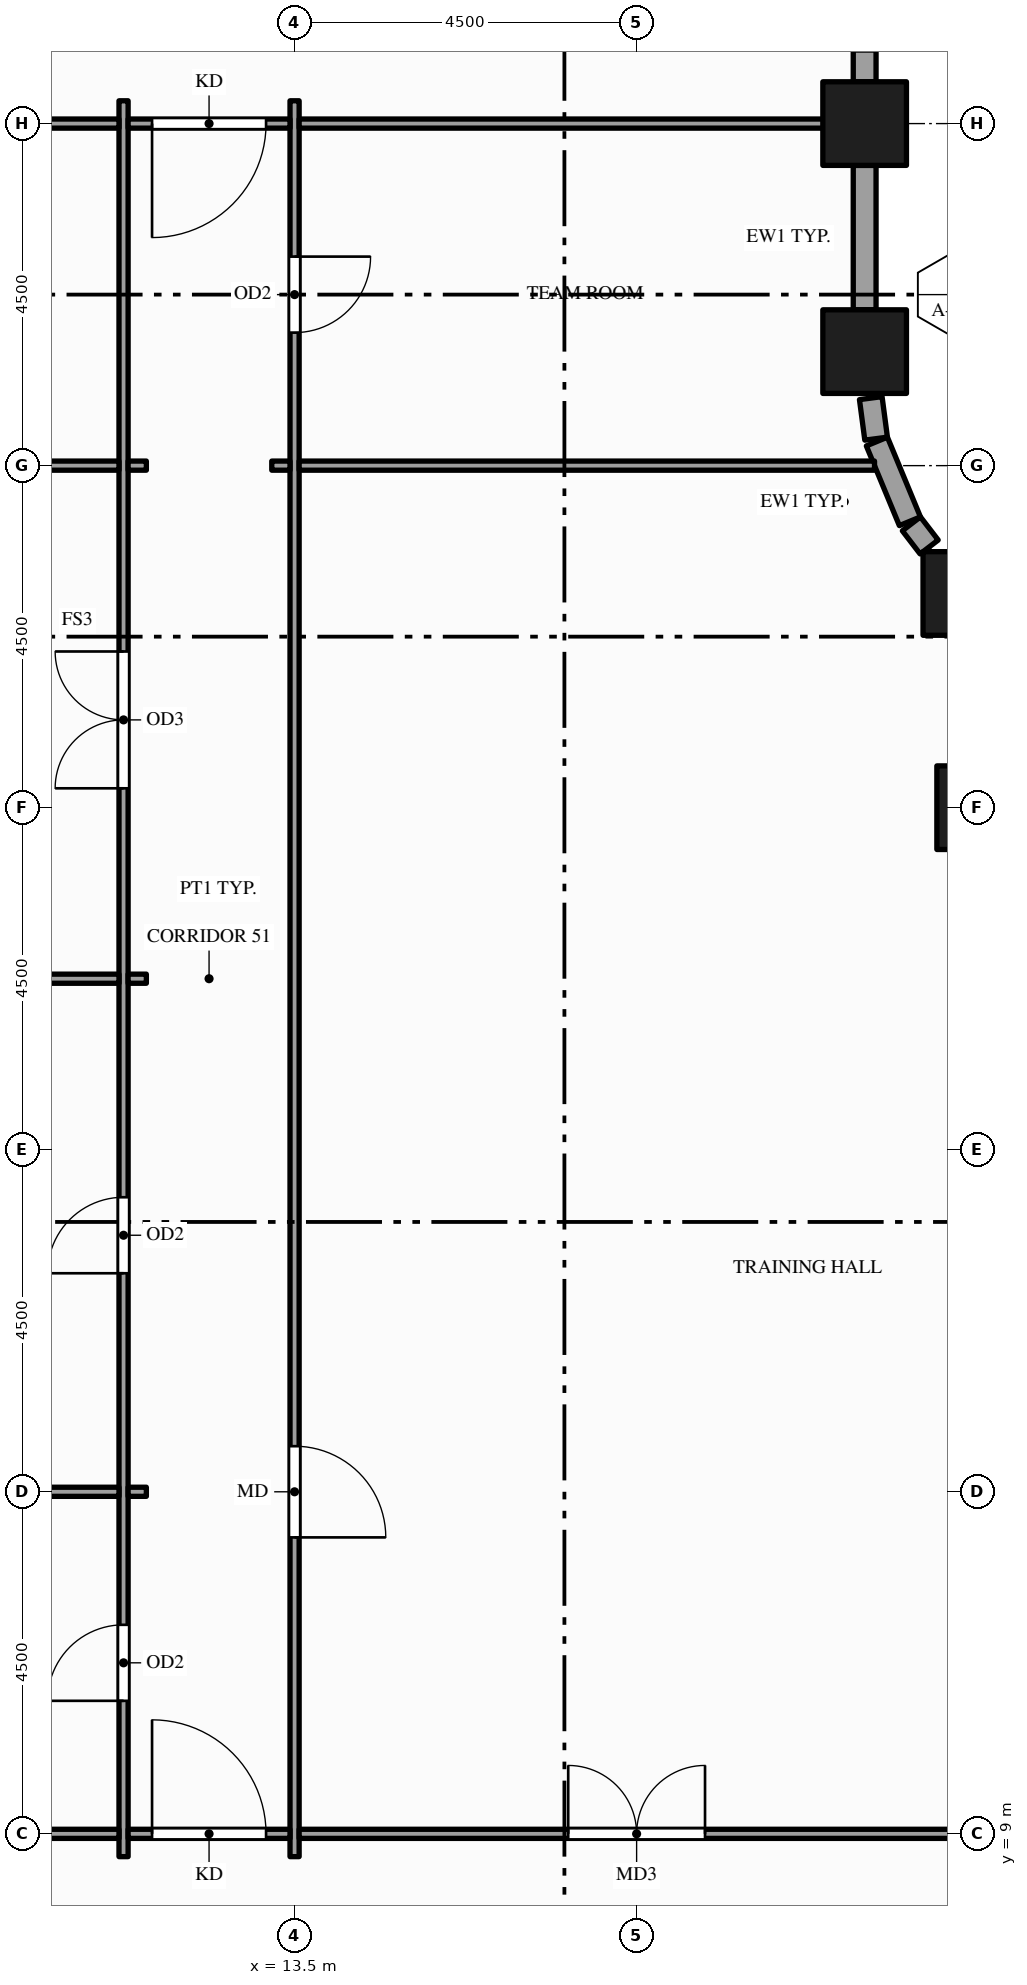
"""IFC4 building model, lengths in metres.
Left out: names, types, materials, properties, quantities, classifications, styles, units other than length and angle.
Written with IfcOpenShell. Run it as: python <this file> out.ifc"""

import sys

from ifc_helpers import new_model, si_unit, direction, frame, frame_2d, origin, origin_2d, place, context, subcontext, project, spatial, rectangle, hollow_rectangle, extrude, element, fill, save


model = new_model("IFC4")
c1 = context("Model", 3, precision=1e-05, world=origin(), true_north=direction((0.0, 1.0)))
c2 = subcontext(c1, "Body", "Model", "MODEL_VIEW")
j1 = project(units=[si_unit("LENGTHUNIT", "METRE"), si_unit("PLANEANGLEUNIT", "RADIAN")], contexts=[c1])
p1 = place(None, origin())
s1 = spatial("IfcSite", under=j1, at=p1, CompositionType="ELEMENT")
p2 = place(p1, origin())
s2 = spatial("IfcBuilding", under=s1, at=p2, CompositionType="ELEMENT")
p3 = place(p2, frame((0.0, 0.0, 49.0)))
s3 = spatial("IfcBuildingStorey", under=s2, at=p3, CompositionType="ELEMENT", Elevation=49.0)
for number, where, z_axis, x_axis in (
    (1, (21.0, 28.5, -0.15), (0.0, 0.0, 1.0), (1.0, 0.0, 0.0)),
    (2, (21.0, 31.5, -0.15), (0.0, 0.0, 1.0), (1.0, 0.0, 0.0)),
    (3, (22.318, 25.318, -0.15), (0.0, 0.0, 1.0), (1.0, 0.0, 0.0)),
    (4, (22.5, 22.5, -0.15), (0.0, 0.0, 1.0), (1.0, 0.0, 0.0)),
):
    element("IfcColumn", number, at=place(p3, frame(where, z_axis=z_axis, x_axis=x_axis)), inside=s3, PredefinedType="COLUMN", context=c2, shape_type="SweptSolid", body=[
        extrude(hollow_rectangle(XDim=1.1, YDim=1.1, WallThickness=0.06, at=origin_2d()), origin(), (0.0, 0.0, 1.0), 4.0),
    ])
p4 = place(p3, frame((21.849, 25.93, 0.0), z_axis=(0.0, 0.0, 1.0), x_axis=(-0.60851163405, 0.79354495224, 0.0)))
e5 = element("IfcWall", 5, at=p4, inside=s3, PredefinedType="STANDARD", context=c2, shape_type="SweptSolid", body=[
    extrude(rectangle(XDim=0.384, YDim=0.3, at=frame_2d((0.192, 0.0))), origin(), (0.0, 0.0, 1.0), 3.144),
])
p5 = place(p3, frame((21.595, 26.268, 0.0), z_axis=(0.0, 0.0, 1.0), x_axis=(-0.382598720491, 0.923914616768, 0.0)))
e6 = element("IfcWall", 6, at=p5, inside=s3, PredefinedType="STANDARD", context=c2, shape_type="SweptSolid", body=[
    extrude(rectangle(XDim=1.135, YDim=0.3, at=frame_2d((0.568, 0.0))), origin(), (0.0, 0.0, 1.0), 3.144),
])
p6 = place(p3, frame((21.151, 27.355, 0.0), z_axis=(0.0, 0.0, 1.0), x_axis=(-0.130736330569, 0.991417173479, 0.0)))
e7 = element("IfcWall", 7, at=p6, inside=s3, PredefinedType="STANDARD", context=c2, shape_type="SweptSolid", body=[
    extrude(rectangle(XDim=0.538, YDim=0.3, at=frame_2d((0.269, 0.0))), origin(), (0.0, 0.0, 1.0), 3.144),
])
p7 = place(p3, frame((21.0, 29.05, 0.0), z_axis=(0.0, 0.0, 1.0), x_axis=(0.0, 1.0, 0.0)))
e8 = element("IfcWall", 8, at=p7, inside=s3, PredefinedType="STANDARD", context=c2, shape_type="SweptSolid", body=[
    extrude(rectangle(XDim=1.9, YDim=0.3, at=frame_2d((0.95, 0.0))), origin(), (0.0, 0.0, 1.0), 3.144),
])
p8 = place(p3, frame((21.0, 32.05, 0.0), z_axis=(0.0, 0.0, 1.0), x_axis=(0.0, 1.0, 0.0)))
e9 = element("IfcWall", 9, at=p8, inside=s3, PredefinedType="STANDARD", context=c2, shape_type="SweptSolid", body=[
    extrude(rectangle(XDim=3.95, YDim=0.3, at=frame_2d((1.975, 0.0))), origin(), (0.0, 0.0, 1.0), 3.144),
])
p9 = place(p8, frame((0.4, 0.0, 0.9)))
e10 = element("IfcOpeningElement", 10, at=p9, cuts=e9, PredefinedType="OPENING", context=c2, shape_type="SweptSolid", body=[
    extrude(rectangle(XDim=1.0, YDim=2.0, at=frame_2d((0.5, 1.0))), frame((0.0, 0.16, 0.0), z_axis=(0.0, -1.0, 0.0), x_axis=(1.0, 0.0, 0.0)), (0.0, 0.0, 1.0), 0.32),
])
p10 = place(p8, frame((2.0, 0.0, 0.9)))
e11 = element("IfcOpeningElement", 11, at=p10, cuts=e9, PredefinedType="OPENING", context=c2, shape_type="SweptSolid", body=[
    extrude(rectangle(XDim=1.55, YDim=2.0, at=frame_2d((0.775, 1.0))), frame((0.0, 0.16, 0.0), z_axis=(0.0, -1.0, 0.0), x_axis=(1.0, 0.0, 0.0)), (0.0, 0.0, 1.0), 0.32),
])
p11 = place(p3, frame((11.25, 8.7, 0.0), z_axis=(0.0, 0.0, 1.0), x_axis=(0.0, 1.0, 0.0)))
e12 = element("IfcWall", 12, at=p11, inside=s3, PredefinedType="PARTITIONING", context=c2, shape_type="SweptSolid", body=[
    extrude(rectangle(XDim=23.1, YDim=0.12, at=frame_2d((11.55, 0.0))), origin(), (0.0, 0.0, 1.0), 2.6),
])
p12 = place(p11, frame((2.05, 0.0, 0.0)))
e13 = element("IfcOpeningElement", 13, at=p12, cuts=e12, PredefinedType="OPENING", context=c2, shape_type="SweptSolid", body=[
    extrude(rectangle(XDim=1.0, YDim=2.1, at=frame_2d((0.5, 1.05))), frame((0.0, 0.07, 0.0), z_axis=(0.0, -1.0, 0.0), x_axis=(1.0, 0.0, 0.0)), (0.0, 0.0, 1.0), 0.14),
])
p13 = place(p11, frame((7.675, 0.0, 0.0)))
e14 = element("IfcOpeningElement", 14, at=p13, cuts=e12, PredefinedType="OPENING", context=c2, shape_type="SweptSolid", body=[
    extrude(rectangle(XDim=1.0, YDim=2.1, at=frame_2d((0.5, 1.05))), frame((0.0, 0.07, 0.0), z_axis=(0.0, -1.0, 0.0), x_axis=(1.0, 0.0, 0.0)), (0.0, 0.0, 1.0), 0.14),
])
p14 = place(p11, frame((14.055, 0.0, 0.0)))
e15 = element("IfcOpeningElement", 15, at=p14, cuts=e12, PredefinedType="OPENING", context=c2, shape_type="SweptSolid", body=[
    extrude(rectangle(XDim=1.8, YDim=2.1, at=frame_2d((0.9, 1.05))), frame((0.0, 0.07, 0.0), z_axis=(0.0, -1.0, 0.0), x_axis=(1.0, 0.0, 0.0)), (0.0, 0.0, 1.0), 0.14),
])
p15 = place(p3, frame((13.5, 8.7, 0.0), z_axis=(0.0, 0.0, 1.0), x_axis=(0.0, 1.0, 0.0)))
e16 = element("IfcWall", 16, at=p15, inside=s3, PredefinedType="PARTITIONING", context=c2, shape_type="SweptSolid", body=[
    extrude(rectangle(XDim=23.1, YDim=0.12, at=frame_2d((11.55, 0.0))), origin(), (0.0, 0.0, 1.0), 2.6),
])
p16 = place(p15, frame((20.05, 0.0, 0.0)))
e17 = element("IfcOpeningElement", 17, at=p16, cuts=e16, PredefinedType="OPENING", context=c2, shape_type="SweptSolid", body=[
    extrude(rectangle(XDim=1.0, YDim=2.1, at=frame_2d((0.5, 1.05))), frame((0.0, 0.07, 0.0), z_axis=(0.0, -1.0, 0.0), x_axis=(1.0, 0.0, 0.0)), (0.0, 0.0, 1.0), 0.14),
])
p17 = place(p15, frame((4.2, 0.0, 0.0)))
e18 = element("IfcOpeningElement", 18, at=p17, cuts=e16, PredefinedType="OPENING", context=c2, shape_type="SweptSolid", body=[
    extrude(rectangle(XDim=1.2, YDim=2.1, at=frame_2d((0.6, 1.05))), frame((0.0, 0.07, 0.0), z_axis=(0.0, -1.0, 0.0), x_axis=(1.0, 0.0, 0.0)), (0.0, 0.0, 1.0), 0.14),
])
p18 = place(p3, frame((0.15, 9.0, 0.0), z_axis=(0.0, 0.0, 1.0), x_axis=(1.0, 0.0, 0.0)))
e19 = element("IfcWall", 19, at=p18, inside=s3, PredefinedType="PARTITIONING", context=c2, shape_type="SweptSolid", body=[
    extrude(rectangle(XDim=11.04, YDim=0.12, at=frame_2d((5.52, 0.0))), origin(), (0.0, 0.0, 1.0), 2.938),
])
p19 = place(p3, frame((11.31, 9.0, 0.0), z_axis=(0.0, 0.0, 1.0), x_axis=(1.0, 0.0, 0.0)))
e20 = element("IfcWall", 20, at=p19, inside=s3, PredefinedType="PARTITIONING", context=c2, shape_type="SweptSolid", body=[
    extrude(rectangle(XDim=2.13, YDim=0.12, at=frame_2d((1.065, 0.0))), origin(), (0.0, 0.0, 1.0), 2.938),
])
p20 = place(p19, frame((0.315, 0.0, 0.0)))
e21 = element("IfcOpeningElement", 21, at=p20, cuts=e20, PredefinedType="OPENING", context=c2, shape_type="SweptSolid", body=[
    extrude(rectangle(XDim=1.5, YDim=2.1, at=frame_2d((0.75, 1.05))), frame((0.0, 0.07, 0.0), z_axis=(0.0, -1.0, 0.0), x_axis=(1.0, 0.0, 0.0)), (0.0, 0.0, 1.0), 0.14),
])
p21 = place(p3, frame((13.56, 9.0, 0.0), z_axis=(0.0, 0.0, 1.0), x_axis=(1.0, 0.0, 0.0)))
e22 = element("IfcWall", 22, at=p21, inside=s3, PredefinedType="PARTITIONING", context=c2, shape_type="SweptSolid", body=[
    extrude(rectangle(XDim=13.38, YDim=0.12, at=frame_2d((6.69, 0.0))), origin(), (0.0, 0.0, 1.0), 2.938),
])
p22 = place(p21, frame((3.54, 0.0, 0.0)))
e23 = element("IfcOpeningElement", 23, at=p22, cuts=e22, PredefinedType="OPENING", context=c2, shape_type="SweptSolid", body=[
    extrude(rectangle(XDim=1.8, YDim=2.1, at=frame_2d((0.9, 1.05))), frame((0.0, 0.07, 0.0), z_axis=(0.0, -1.0, 0.0), x_axis=(1.0, 0.0, 0.0)), (0.0, 0.0, 1.0), 0.14),
])
p23 = place(p3, frame((0.15, 13.5, 0.0), z_axis=(0.0, 0.0, 1.0), x_axis=(1.0, 0.0, 0.0)))
e24 = element("IfcWall", 24, at=p23, inside=s3, PredefinedType="PARTITIONING", context=c2, shape_type="SweptSolid", body=[
    extrude(rectangle(XDim=11.04, YDim=0.12, at=frame_2d((5.52, 0.0))), origin(), (0.0, 0.0, 1.0), 2.938),
])
p24 = place(p3, frame((11.31, 13.5, 0.0), z_axis=(0.0, 0.0, 1.0), x_axis=(1.0, 0.0, 0.0)))
e25 = element("IfcWall", 25, at=p24, inside=s3, PredefinedType="PARTITIONING", context=c2, shape_type="SweptSolid", body=[
    extrude(rectangle(XDim=0.24, YDim=0.12, at=frame_2d((0.12, 0.0))), origin(), (0.0, 0.0, 1.0), 2.938),
])
p25 = place(p3, frame((0.15, 20.25, 0.0), z_axis=(0.0, 0.0, 1.0), x_axis=(1.0, 0.0, 0.0)))
e26 = element("IfcWall", 26, at=p25, inside=s3, PredefinedType="PARTITIONING", context=c2, shape_type="SweptSolid", body=[
    extrude(rectangle(XDim=11.04, YDim=0.12, at=frame_2d((5.52, 0.0))), origin(), (0.0, 0.0, 1.0), 2.938),
])
p26 = place(p3, frame((11.31, 20.25, 0.0), z_axis=(0.0, 0.0, 1.0), x_axis=(1.0, 0.0, 0.0)))
e27 = element("IfcWall", 27, at=p26, inside=s3, PredefinedType="PARTITIONING", context=c2, shape_type="SweptSolid", body=[
    extrude(rectangle(XDim=0.24, YDim=0.12, at=frame_2d((0.12, 0.0))), origin(), (0.0, 0.0, 1.0), 2.938),
])
p27 = place(p3, frame((7.06, 27.0, 0.0), z_axis=(0.0, 0.0, 1.0), x_axis=(1.0, 0.0, 0.0)))
e28 = element("IfcWall", 28, at=p27, inside=s3, PredefinedType="PARTITIONING", context=c2, shape_type="SweptSolid", body=[
    extrude(rectangle(XDim=4.13, YDim=0.12, at=frame_2d((2.065, 0.0))), origin(), (0.0, 0.0, 1.0), 2.938),
])
for number, where, z_axis, x_axis in (
    (29, (11.31, 27.0, 0.0), (0.0, 0.0, 1.0), (1.0, 0.0, 0.0)),
    (30, (13.2, 27.0, 0.0), (0.0, 0.0, 1.0), (1.0, 0.0, 0.0)),
):
    element("IfcWall", number, at=place(p3, frame(where, z_axis=z_axis, x_axis=x_axis)), inside=s3, PredefinedType="PARTITIONING", context=c2, shape_type="SweptSolid", body=[
        extrude(rectangle(XDim=0.24, YDim=0.12, at=frame_2d((0.12, 0.0))), origin(), (0.0, 0.0, 1.0), 2.938),
    ])
p28 = place(p3, frame((13.56, 27.0, 0.0), z_axis=(0.0, 0.0, 1.0), x_axis=(1.0, 0.0, 0.0)))
e31 = element("IfcWall", 31, at=p28, inside=s3, PredefinedType="PARTITIONING", context=c2, shape_type="SweptSolid", body=[
    extrude(rectangle(XDim=7.57, YDim=0.12, at=frame_2d((3.785, 0.0))), origin(), (0.0, 0.0, 1.0), 2.938),
])
p29 = place(p3, frame((7.06, 31.5, 0.0), z_axis=(0.0, 0.0, 1.0), x_axis=(1.0, 0.0, 0.0)))
e32 = element("IfcWall", 32, at=p29, inside=s3, PredefinedType="PARTITIONING", context=c2, shape_type="SweptSolid", body=[
    extrude(rectangle(XDim=4.13, YDim=0.12, at=frame_2d((2.065, 0.0))), origin(), (0.0, 0.0, 1.0), 2.938),
])
p30 = place(p29, frame((1.565, 0.0, 0.0)))
e33 = element("IfcOpeningElement", 33, at=p30, cuts=e32, PredefinedType="OPENING", context=c2, shape_type="SweptSolid", body=[
    extrude(rectangle(XDim=1.0, YDim=2.1, at=frame_2d((0.5, 1.05))), frame((0.0, 0.07, 0.0), z_axis=(0.0, -1.0, 0.0), x_axis=(1.0, 0.0, 0.0)), (0.0, 0.0, 1.0), 0.14),
])
p31 = place(p3, frame((11.31, 31.5, 0.0), z_axis=(0.0, 0.0, 1.0), x_axis=(1.0, 0.0, 0.0)))
e34 = element("IfcWall", 34, at=p31, inside=s3, PredefinedType="PARTITIONING", context=c2, shape_type="SweptSolid", body=[
    extrude(rectangle(XDim=2.13, YDim=0.12, at=frame_2d((1.065, 0.0))), origin(), (0.0, 0.0, 1.0), 2.938),
])
p32 = place(p31, frame((0.315, 0.0, 0.0)))
e35 = element("IfcOpeningElement", 35, at=p32, cuts=e34, PredefinedType="OPENING", context=c2, shape_type="SweptSolid", body=[
    extrude(rectangle(XDim=1.5, YDim=2.1, at=frame_2d((0.75, 1.05))), frame((0.0, 0.07, 0.0), z_axis=(0.0, -1.0, 0.0), x_axis=(1.0, 0.0, 0.0)), (0.0, 0.0, 1.0), 0.14),
])
p33 = place(p3, frame((13.56, 31.5, 0.0), z_axis=(0.0, 0.0, 1.0), x_axis=(1.0, 0.0, 0.0)))
e36 = element("IfcWall", 36, at=p33, inside=s3, PredefinedType="PARTITIONING", context=c2, shape_type="SweptSolid", body=[
    extrude(rectangle(XDim=7.29, YDim=0.12, at=frame_2d((3.645, 0.0))), origin(), (0.0, 0.0, 1.0), 2.938),
])
p34 = place(p22, origin())
e37 = element("IfcDoor", 37, at=p34, inside=s3, OperationType="DOUBLE_DOOR_SINGLE_SWING", PredefinedType="DOOR", context=c2, shape_type="SweptSolid", body=[
    extrude(rectangle(XDim=1.8, YDim=2.1, at=frame_2d((0.9, 1.05))), frame((0.0, 0.025, 0.0), z_axis=(0.0, -1.0, 0.0), x_axis=(1.0, 0.0, 0.0)), (0.0, 0.0, 1.0), 0.05),
])
fill(e23, e37)
p35 = place(p20, origin())
e38 = element("IfcDoor", 38, at=p35, inside=s3, OperationType="SINGLE_SWING_LEFT", PredefinedType="DOOR", context=c2, shape_type="SweptSolid", body=[
    extrude(rectangle(XDim=1.5, YDim=2.1, at=frame_2d((0.75, 1.05))), frame((0.0, 0.025, 0.0), z_axis=(0.0, -1.0, 0.0), x_axis=(1.0, 0.0, 0.0)), (0.0, 0.0, 1.0), 0.05),
])
fill(e21, e38)
p36 = place(p32, origin())
e39 = element("IfcDoor", 39, at=p36, inside=s3, OperationType="SINGLE_SWING_LEFT", PredefinedType="DOOR", context=c2, shape_type="SweptSolid", body=[
    extrude(rectangle(XDim=1.5, YDim=2.1, at=frame_2d((0.75, 1.05))), frame((0.0, 0.025, 0.0), z_axis=(0.0, -1.0, 0.0), x_axis=(1.0, 0.0, 0.0)), (0.0, 0.0, 1.0), 0.05),
])
fill(e35, e39)
p37 = place(p12, origin())
e40 = element("IfcDoor", 40, at=p37, inside=s3, OperationType="SINGLE_SWING_LEFT", PredefinedType="DOOR", context=c2, shape_type="SweptSolid", body=[
    extrude(rectangle(XDim=1.0, YDim=2.1, at=frame_2d((0.5, 1.05))), frame((0.0, 0.025, 0.0), z_axis=(0.0, -1.0, 0.0), x_axis=(1.0, 0.0, 0.0)), (0.0, 0.0, 1.0), 0.05),
])
fill(e13, e40)
p38 = place(p13, origin())
e41 = element("IfcDoor", 41, at=p38, inside=s3, OperationType="SINGLE_SWING_LEFT", PredefinedType="DOOR", context=c2, shape_type="SweptSolid", body=[
    extrude(rectangle(XDim=1.0, YDim=2.1, at=frame_2d((0.5, 1.05))), frame((0.0, 0.025, 0.0), z_axis=(0.0, -1.0, 0.0), x_axis=(1.0, 0.0, 0.0)), (0.0, 0.0, 1.0), 0.05),
])
fill(e14, e41)
p39 = place(p14, origin())
e42 = element("IfcDoor", 42, at=p39, inside=s3, OperationType="DOUBLE_DOOR_SINGLE_SWING", PredefinedType="DOOR", context=c2, shape_type="SweptSolid", body=[
    extrude(rectangle(XDim=1.8, YDim=2.1, at=frame_2d((0.9, 1.05))), frame((0.0, 0.025, 0.0), z_axis=(0.0, -1.0, 0.0), x_axis=(1.0, 0.0, 0.0)), (0.0, 0.0, 1.0), 0.05),
])
fill(e15, e42)
p40 = place(p16, origin())
e43 = element("IfcDoor", 43, at=p40, inside=s3, OperationType="SINGLE_SWING_RIGHT", PredefinedType="DOOR", context=c2, shape_type="SweptSolid", body=[
    extrude(rectangle(XDim=1.0, YDim=2.1, at=frame_2d((0.5, 1.05))), frame((0.0, 0.025, 0.0), z_axis=(0.0, -1.0, 0.0), x_axis=(1.0, 0.0, 0.0)), (0.0, 0.0, 1.0), 0.05),
])
fill(e17, e43)
p41 = place(p17, origin())
e44 = element("IfcDoor", 44, at=p41, inside=s3, OperationType="SINGLE_SWING_LEFT", PredefinedType="DOOR", context=c2, shape_type="SweptSolid", body=[
    extrude(rectangle(XDim=1.2, YDim=2.1, at=frame_2d((0.6, 1.05))), frame((0.0, 0.025, 0.0), z_axis=(0.0, -1.0, 0.0), x_axis=(1.0, 0.0, 0.0)), (0.0, 0.0, 1.0), 0.05),
])
fill(e18, e44)
save(model, sys.argv[1])
